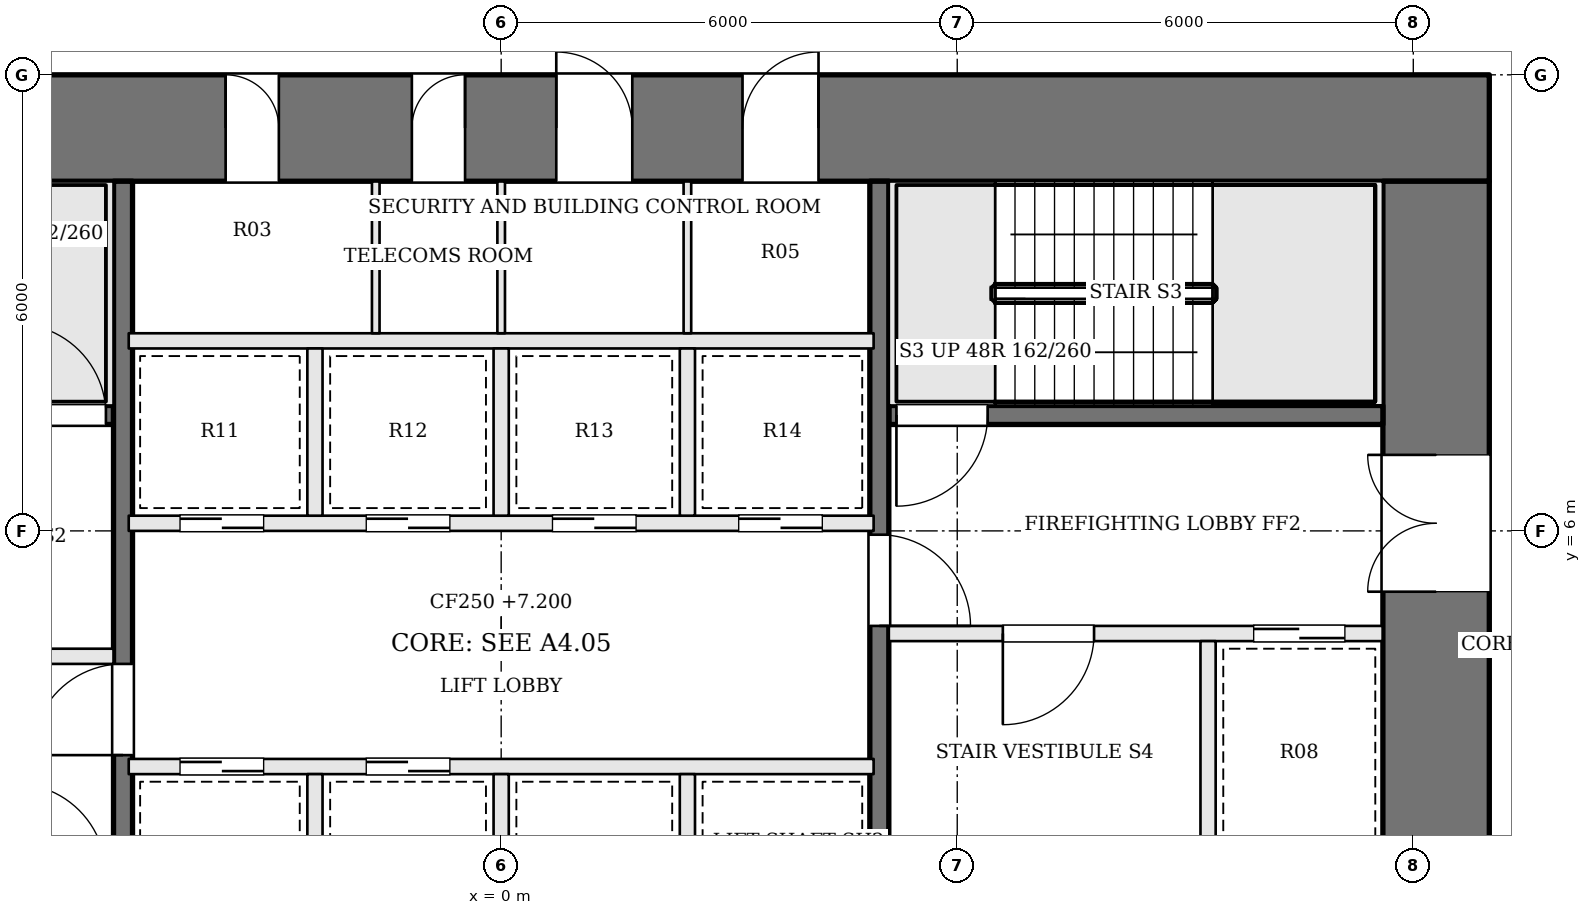
"""IFC4 building model, lengths in metres.
Left out: names, types, materials, properties, quantities, classifications, styles, units other than length and angle.
Written with IfcOpenShell. Run it as: python <this file> out.ifc"""

import sys

from ifc_helpers import new_model, si_unit, direction, frame, frame_2d, origin, place, context, subcontext, project, spatial, rectangle, extrude, element, fill, save


model = new_model("IFC4")
c1 = context("Model", 3, precision=1e-05, world=origin(), true_north=direction((0.0, 1.0)))
c2 = subcontext(c1, "Body", "Model", "MODEL_VIEW")
j1 = project(units=[si_unit("LENGTHUNIT", "METRE"), si_unit("PLANEANGLEUNIT", "RADIAN")], contexts=[c1])
p1 = place(None, origin())
s1 = spatial("IfcSite", under=j1, at=p1, CompositionType="ELEMENT")
p2 = place(p1, origin())
s2 = spatial("IfcBuilding", under=s1, at=p2, CompositionType="ELEMENT")
p3 = place(p2, frame((0.0, 0.0, 7.2)))
s3 = spatial("IfcBuildingStorey", under=s2, at=p3, CompositionType="ELEMENT", Elevation=7.2)
p4 = place(p3, frame((-13.0, 11.3, 0.0), z_axis=(0.0, 0.0, 1.0), x_axis=(1.0, 0.0, 0.0)))
e1 = element("IfcWall", 1, at=p4, inside=s3, PredefinedType="SHEAR", context=c2, shape_type="SweptSolid", body=[
    extrude(rectangle(XDim=26.0, YDim=1.4, at=frame_2d((13.0, 0.0))), origin(), (0.0, 0.0, 1.0), 7.8),
])
p5 = place(p4, frame((9.375, 0.0, 0.0)))
e2 = element("IfcOpeningElement", 2, at=p5, cuts=e1, PredefinedType="OPENING", context=c2, shape_type="SweptSolid", body=[
    extrude(rectangle(XDim=0.7, YDim=2.1, at=frame_2d((0.35, 1.05))), frame((0.0, 0.71, 0.0), z_axis=(0.0, -1.0, 0.0), x_axis=(1.0, 0.0, 0.0)), (0.0, 0.0, 1.0), 1.42),
])
p6 = place(p4, frame((11.825, 0.0, 0.0)))
e3 = element("IfcOpeningElement", 3, at=p6, cuts=e1, PredefinedType="OPENING", context=c2, shape_type="SweptSolid", body=[
    extrude(rectangle(XDim=0.7, YDim=2.1, at=frame_2d((0.35, 1.05))), frame((0.0, 0.71, 0.0), z_axis=(0.0, -1.0, 0.0), x_axis=(1.0, 0.0, 0.0)), (0.0, 0.0, 1.0), 1.42),
])
p7 = place(p4, frame((13.725, 0.0, 0.0)))
e4 = element("IfcOpeningElement", 4, at=p7, cuts=e1, PredefinedType="OPENING", context=c2, shape_type="SweptSolid", body=[
    extrude(rectangle(XDim=1.0, YDim=2.1, at=frame_2d((0.5, 1.05))), frame((0.0, 0.71, 0.0), z_axis=(0.0, -1.0, 0.0), x_axis=(1.0, 0.0, 0.0)), (0.0, 0.0, 1.0), 1.42),
])
p8 = place(p4, frame((16.175, 0.0, 0.0)))
e5 = element("IfcOpeningElement", 5, at=p8, cuts=e1, PredefinedType="OPENING", context=c2, shape_type="SweptSolid", body=[
    extrude(rectangle(XDim=1.0, YDim=2.1, at=frame_2d((0.5, 1.05))), frame((0.0, 0.71, 0.0), z_axis=(0.0, -1.0, 0.0), x_axis=(1.0, 0.0, 0.0)), (0.0, 0.0, 1.0), 1.42),
])
p9 = place(p3, frame((12.3, -1.6, 0.0), z_axis=(0.0, 0.0, 1.0), x_axis=(0.0, 1.0, 0.0)))
e6 = element("IfcWall", 6, at=p9, inside=s3, PredefinedType="SHEAR", context=c2, shape_type="SweptSolid", body=[
    extrude(rectangle(XDim=12.2, YDim=1.4, at=frame_2d((6.1, 0.0))), origin(), (0.0, 0.0, 1.0), 7.8),
])
p10 = place(p9, frame((6.8, 0.0, 0.0)))
e7 = element("IfcOpeningElement", 7, at=p10, cuts=e6, PredefinedType="OPENING", context=c2, shape_type="SweptSolid", body=[
    extrude(rectangle(XDim=1.8, YDim=2.1, at=frame_2d((0.9, 1.05))), frame((0.0, 0.71, 0.0), z_axis=(0.0, -1.0, 0.0), x_axis=(1.0, 0.0, 0.0)), (0.0, 0.0, 1.0), 1.42),
])
p11 = place(p3, frame((11.6, 7.525, 0.0), z_axis=(0.0, 0.0, 1.0), x_axis=(-1.0, 0.0, 0.0)))
e8 = element("IfcWall", 8, at=p11, inside=s3, PredefinedType="SOLIDWALL", context=c2, shape_type="SweptSolid", body=[
    extrude(rectangle(XDim=6.5, YDim=0.25, at=frame_2d((3.25, 0.0))), origin(), (0.0, 0.0, 1.0), 7.55),
])
p12 = place(p11, frame((5.2, 0.0, 0.0)))
e9 = element("IfcOpeningElement", 9, at=p12, cuts=e8, PredefinedType="OPENING", context=c2, shape_type="SweptSolid", body=[
    extrude(rectangle(XDim=1.2, YDim=2.1, at=frame_2d((0.6, 1.05))), frame((0.0, 0.135, 0.0), z_axis=(0.0, -1.0, 0.0), x_axis=(1.0, 0.0, 0.0)), (0.0, 0.0, 1.0), 0.27),
])
p13 = place(p3, frame((-11.6, 4.35, 0.0), z_axis=(0.0, 0.0, 1.0), x_axis=(1.0, 0.0, 0.0)))
e10 = element("IfcWall", 10, at=p13, inside=s3, PredefinedType="SOLIDWALL", context=c2, shape_type="SweptSolid", body=[
    extrude(rectangle(XDim=6.5, YDim=0.2, at=frame_2d((3.25, 0.0))), origin(), (0.0, 0.0, 1.0), 7.55),
])
p14 = place(p13, frame((3.8, 0.0, 0.0)))
e11 = element("IfcOpeningElement", 11, at=p14, cuts=e10, PredefinedType="OPENING", context=c2, shape_type="SweptSolid", body=[
    extrude(rectangle(XDim=1.2, YDim=2.1, at=frame_2d((0.6, 1.05))), frame((0.0, 0.11, 0.0), z_axis=(0.0, -1.0, 0.0), x_axis=(1.0, 0.0, 0.0)), (0.0, 0.0, 1.0), 0.22),
])
p15 = place(p13, frame((0.5, 0.0, 0.0)))
e12 = element("IfcOpeningElement", 12, at=p15, cuts=e10, PredefinedType="OPENING", context=c2, shape_type="SweptSolid", body=[
    extrude(rectangle(XDim=1.2, YDim=2.1, at=frame_2d((0.6, 1.05))), frame((0.0, 0.11, 0.0), z_axis=(0.0, -1.0, 0.0), x_axis=(1.0, 0.0, 0.0)), (0.0, 0.0, 1.0), 0.22),
])
p16 = place(p3, frame((11.6, 4.65, 0.0), z_axis=(0.0, 0.0, 1.0), x_axis=(-1.0, 0.0, 0.0)))
e13 = element("IfcWall", 13, at=p16, inside=s3, PredefinedType="SOLIDWALL", context=c2, shape_type="SweptSolid", body=[
    extrude(rectangle(XDim=6.5, YDim=0.2, at=frame_2d((3.25, 0.0))), origin(), (0.0, 0.0, 1.0), 7.55),
])
p17 = place(p16, frame((3.8, 0.0, 0.0)))
e14 = element("IfcOpeningElement", 14, at=p17, cuts=e13, PredefinedType="OPENING", context=c2, shape_type="SweptSolid", body=[
    extrude(rectangle(XDim=1.2, YDim=2.1, at=frame_2d((0.6, 1.05))), frame((0.0, 0.11, 0.0), z_axis=(0.0, -1.0, 0.0), x_axis=(1.0, 0.0, 0.0)), (0.0, 0.0, 1.0), 0.22),
])
p18 = place(p16, frame((0.5, 0.0, 0.0)))
e15 = element("IfcOpeningElement", 15, at=p18, cuts=e13, PredefinedType="OPENING", context=c2, shape_type="SweptSolid", body=[
    extrude(rectangle(XDim=1.2, YDim=2.1, at=frame_2d((0.6, 1.05))), frame((0.0, 0.11, 0.0), z_axis=(0.0, -1.0, 0.0), x_axis=(1.0, 0.0, 0.0)), (0.0, 0.0, 1.0), 0.22),
])
p19 = place(p3, frame((-11.6, 7.525, 0.0), z_axis=(0.0, 0.0, 1.0), x_axis=(1.0, 0.0, 0.0)))
e16 = element("IfcWall", 16, at=p19, inside=s3, PredefinedType="SOLIDWALL", context=c2, shape_type="SweptSolid", body=[
    extrude(rectangle(XDim=6.5, YDim=0.25, at=frame_2d((3.25, 0.0))), origin(), (0.0, 0.0, 1.0), 7.55),
])
p20 = place(p19, frame((5.2, 0.0, 0.0)))
e17 = element("IfcOpeningElement", 17, at=p20, cuts=e16, PredefinedType="OPENING", context=c2, shape_type="SweptSolid", body=[
    extrude(rectangle(XDim=1.2, YDim=2.1, at=frame_2d((0.6, 1.05))), frame((0.0, 0.135, 0.0), z_axis=(0.0, -1.0, 0.0), x_axis=(1.0, 0.0, 0.0)), (0.0, 0.0, 1.0), 0.27),
])
p21 = place(p3, frame((9.3, 4.55, 0.0), z_axis=(0.0, 0.0, 1.0), x_axis=(0.0, -1.0, 0.0)))
e18 = element("IfcWall", 18, at=p21, inside=s3, PredefinedType="SOLIDWALL", context=c2, shape_type="SweptSolid", body=[
    extrude(rectangle(XDim=3.0, YDim=0.2, at=frame_2d((1.5, 0.0))), origin(), (0.0, 0.0, 1.0), 7.55),
])
p22 = place(p3, frame((-4.975, -1.6, 0.0), z_axis=(0.0, 0.0, 1.0), x_axis=(0.0, 1.0, 0.0)))
e19 = element("IfcWall", 19, at=p22, inside=s3, PredefinedType="SOLIDWALL", context=c2, shape_type="SweptSolid", body=[
    extrude(rectangle(XDim=12.2, YDim=0.25, at=frame_2d((6.1, 0.0))), origin(), (0.0, 0.0, 1.0), 7.55),
])
p23 = place(p22, frame((4.65, 0.0, 0.0)))
e20 = element("IfcOpeningElement", 20, at=p23, cuts=e19, PredefinedType="OPENING", context=c2, shape_type="SweptSolid", body=[
    extrude(rectangle(XDim=1.2, YDim=2.1, at=frame_2d((0.6, 1.05))), frame((0.0, 0.135, 0.0), z_axis=(0.0, -1.0, 0.0), x_axis=(1.0, 0.0, 0.0)), (0.0, 0.0, 1.0), 0.27),
])
p24 = place(p3, frame((4.975, 10.6, 0.0), z_axis=(0.0, 0.0, 1.0), x_axis=(0.0, -1.0, 0.0)))
e21 = element("IfcWall", 21, at=p24, inside=s3, PredefinedType="SOLIDWALL", context=c2, shape_type="SweptSolid", body=[
    extrude(rectangle(XDim=12.2, YDim=0.25, at=frame_2d((6.1, 0.0))), origin(), (0.0, 0.0, 1.0), 7.55),
])
p25 = place(p24, frame((4.65, 0.0, 0.0)))
e22 = element("IfcOpeningElement", 22, at=p25, cuts=e21, PredefinedType="OPENING", context=c2, shape_type="SweptSolid", body=[
    extrude(rectangle(XDim=1.2, YDim=2.1, at=frame_2d((0.6, 1.05))), frame((0.0, 0.135, 0.0), z_axis=(0.0, -1.0, 0.0), x_axis=(1.0, 0.0, 0.0)), (0.0, 0.0, 1.0), 0.27),
])
p26 = place(p3, frame((-4.9, 2.9, 0.0), z_axis=(0.0, 0.0, 1.0), x_axis=(1.0, 0.0, 0.0)))
e23 = element("IfcWall", 23, at=p26, inside=s3, PredefinedType="SOLIDWALL", context=c2, shape_type="SweptSolid", body=[
    extrude(rectangle(XDim=9.8, YDim=0.2, at=frame_2d((4.9, 0.0))), origin(), (0.0, 0.0, 1.0), 7.55),
])
p27 = place(p26, frame((0.675, 0.0, 0.0)))
e24 = element("IfcOpeningElement", 24, at=p27, cuts=e23, PredefinedType="OPENING", context=c2, shape_type="SweptSolid", body=[
    extrude(rectangle(XDim=1.1, YDim=2.1, at=frame_2d((0.55, 1.05))), frame((0.0, 0.11, 0.0), z_axis=(0.0, -1.0, 0.0), x_axis=(1.0, 0.0, 0.0)), (0.0, 0.0, 1.0), 0.22),
])
p28 = place(p26, frame((3.125, 0.0, 0.0)))
e25 = element("IfcOpeningElement", 25, at=p28, cuts=e23, PredefinedType="OPENING", context=c2, shape_type="SweptSolid", body=[
    extrude(rectangle(XDim=1.1, YDim=2.1, at=frame_2d((0.55, 1.05))), frame((0.0, 0.11, 0.0), z_axis=(0.0, -1.0, 0.0), x_axis=(1.0, 0.0, 0.0)), (0.0, 0.0, 1.0), 0.22),
])
p29 = place(p3, frame((-4.9, 6.1, 0.0), z_axis=(0.0, 0.0, 1.0), x_axis=(1.0, 0.0, 0.0)))
e26 = element("IfcWall", 26, at=p29, inside=s3, PredefinedType="SOLIDWALL", context=c2, shape_type="SweptSolid", body=[
    extrude(rectangle(XDim=9.8, YDim=0.2, at=frame_2d((4.9, 0.0))), origin(), (0.0, 0.0, 1.0), 7.55),
])
p30 = place(p29, frame((0.675, 0.0, 0.0)))
e27 = element("IfcOpeningElement", 27, at=p30, cuts=e26, PredefinedType="OPENING", context=c2, shape_type="SweptSolid", body=[
    extrude(rectangle(XDim=1.1, YDim=2.1, at=frame_2d((0.55, 1.05))), frame((0.0, 0.11, 0.0), z_axis=(0.0, -1.0, 0.0), x_axis=(1.0, 0.0, 0.0)), (0.0, 0.0, 1.0), 0.22),
])
p31 = place(p29, frame((3.125, 0.0, 0.0)))
e28 = element("IfcOpeningElement", 28, at=p31, cuts=e26, PredefinedType="OPENING", context=c2, shape_type="SweptSolid", body=[
    extrude(rectangle(XDim=1.1, YDim=2.1, at=frame_2d((0.55, 1.05))), frame((0.0, 0.11, 0.0), z_axis=(0.0, -1.0, 0.0), x_axis=(1.0, 0.0, 0.0)), (0.0, 0.0, 1.0), 0.22),
])
p32 = place(p29, frame((5.575, 0.0, 0.0)))
e29 = element("IfcOpeningElement", 29, at=p32, cuts=e26, PredefinedType="OPENING", context=c2, shape_type="SweptSolid", body=[
    extrude(rectangle(XDim=1.1, YDim=2.1, at=frame_2d((0.55, 1.05))), frame((0.0, 0.11, 0.0), z_axis=(0.0, -1.0, 0.0), x_axis=(1.0, 0.0, 0.0)), (0.0, 0.0, 1.0), 0.22),
])
p33 = place(p29, frame((8.025, 0.0, 0.0)))
e30 = element("IfcOpeningElement", 30, at=p33, cuts=e26, PredefinedType="OPENING", context=c2, shape_type="SweptSolid", body=[
    extrude(rectangle(XDim=1.1, YDim=2.1, at=frame_2d((0.55, 1.05))), frame((0.0, 0.11, 0.0), z_axis=(0.0, -1.0, 0.0), x_axis=(1.0, 0.0, 0.0)), (0.0, 0.0, 1.0), 0.22),
])
p34 = place(p3, frame((-4.9, 8.5, 0.0), z_axis=(0.0, 0.0, 1.0), x_axis=(1.0, 0.0, 0.0)))
e31 = element("IfcWall", 31, at=p34, inside=s3, PredefinedType="SOLIDWALL", context=c2, shape_type="SweptSolid", body=[
    extrude(rectangle(XDim=9.8, YDim=0.2, at=frame_2d((4.9, 0.0))), origin(), (0.0, 0.0, 1.0), 7.55),
])
for number, where, z_axis, x_axis in (
    (32, (-2.45, 0.6, 0.0), (0.0, 0.0, 1.0), (0.0, 1.0, 0.0)),
    (33, (0.0, 0.6, 0.0), (0.0, 0.0, 1.0), (0.0, 1.0, 0.0)),
    (34, (2.45, 0.6, 0.0), (0.0, 0.0, 1.0), (0.0, 1.0, 0.0)),
    (35, (-2.45, 6.2, 0.0), (0.0, 0.0, 1.0), (0.0, 1.0, 0.0)),
    (36, (0.0, 6.2, 0.0), (0.0, 0.0, 1.0), (0.0, 1.0, 0.0)),
    (37, (2.45, 6.2, 0.0), (0.0, 0.0, 1.0), (0.0, 1.0, 0.0)),
):
    element("IfcWall", number, at=place(p3, frame(where, z_axis=z_axis, x_axis=x_axis)), inside=s3, PredefinedType="SOLIDWALL", context=c2, shape_type="SweptSolid", body=[
        extrude(rectangle(XDim=2.2, YDim=0.2, at=frame_2d((1.1, 0.0))), origin(), (0.0, 0.0, 1.0), 7.55),
    ])
for number, where, z_axis, x_axis in (
    (38, (-1.65, 8.6, 0.0), (0.0, 0.0, 1.0), (0.0, 1.0, 0.0)),
    (39, (0.0, 8.6, 0.0), (0.0, 0.0, 1.0), (0.0, 1.0, 0.0)),
    (40, (2.45, 8.6, 0.0), (0.0, 0.0, 1.0), (0.0, 1.0, 0.0)),
):
    element("IfcWall", number, at=place(p3, frame(where, z_axis=z_axis, x_axis=x_axis)), inside=s3, PredefinedType="PARTITIONING", context=c2, shape_type="SweptSolid", body=[
        extrude(rectangle(XDim=2.0, YDim=0.1, at=frame_2d((1.0, 0.0))), origin(), (0.0, 0.0, 1.0), 7.55),
    ])
p35 = place(p10, origin())
e41 = element("IfcDoor", 41, at=p35, inside=s3, OperationType="DOUBLE_DOOR_SINGLE_SWING", PredefinedType="DOOR", context=c2, shape_type="SweptSolid", body=[
    extrude(rectangle(XDim=1.8, YDim=2.1, at=frame_2d((0.9, 1.05))), frame((0.0, 0.025, 0.0), z_axis=(0.0, -1.0, 0.0), x_axis=(1.0, 0.0, 0.0)), (0.0, 0.0, 1.0), 0.05),
])
fill(e7, e41)
p36 = place(p23, origin())
e42 = element("IfcDoor", 42, at=p36, inside=s3, OperationType="SINGLE_SWING_LEFT", PredefinedType="DOOR", context=c2, shape_type="SweptSolid", body=[
    extrude(rectangle(XDim=1.2, YDim=2.1, at=frame_2d((0.6, 1.05))), frame((0.0, 0.025, 0.0), z_axis=(0.0, -1.0, 0.0), x_axis=(1.0, 0.0, 0.0)), (0.0, 0.0, 1.0), 0.05),
])
fill(e20, e42)
p37 = place(p25, origin())
e43 = element("IfcDoor", 43, at=p37, inside=s3, OperationType="SINGLE_SWING_RIGHT", PredefinedType="DOOR", context=c2, shape_type="SweptSolid", body=[
    extrude(rectangle(XDim=1.2, YDim=2.1, at=frame_2d((0.6, 1.05))), frame((0.0, 0.025, 0.0), z_axis=(0.0, -1.0, 0.0), x_axis=(1.0, 0.0, 0.0)), (0.0, 0.0, 1.0), 0.05),
])
fill(e22, e43)
p38 = place(p17, origin())
e44 = element("IfcDoor", 44, at=p38, inside=s3, OperationType="SINGLE_SWING_RIGHT", PredefinedType="DOOR", context=c2, shape_type="SweptSolid", body=[
    extrude(rectangle(XDim=1.2, YDim=2.1, at=frame_2d((0.6, 1.05))), frame((0.0, 0.025, 0.0), z_axis=(0.0, -1.0, 0.0), x_axis=(1.0, 0.0, 0.0)), (0.0, 0.0, 1.0), 0.05),
])
fill(e14, e44)
p39 = place(p12, origin())
e45 = element("IfcDoor", 45, at=p39, inside=s3, OperationType="SINGLE_SWING_RIGHT", PredefinedType="DOOR", context=c2, shape_type="SweptSolid", body=[
    extrude(rectangle(XDim=1.2, YDim=2.1, at=frame_2d((0.6, 1.05))), frame((0.0, 0.025, 0.0), z_axis=(0.0, -1.0, 0.0), x_axis=(1.0, 0.0, 0.0)), (0.0, 0.0, 1.0), 0.05),
])
fill(e9, e45)
p40 = place(p20, origin())
e46 = element("IfcDoor", 46, at=p40, inside=s3, OperationType="SINGLE_SWING_LEFT", PredefinedType="DOOR", context=c2, shape_type="SweptSolid", body=[
    extrude(rectangle(XDim=1.2, YDim=2.1, at=frame_2d((0.6, 1.05))), frame((0.0, 0.025, 0.0), z_axis=(0.0, -1.0, 0.0), x_axis=(1.0, 0.0, 0.0)), (0.0, 0.0, 1.0), 0.05),
])
fill(e17, e46)
p41 = place(p18, origin())
e47 = element("IfcDoor", 47, at=p41, inside=s3, OperationType="SLIDING_TO_RIGHT", PredefinedType="DOOR", context=c2, shape_type="SweptSolid", body=[
    extrude(rectangle(XDim=1.2, YDim=2.1, at=frame_2d((0.6, 1.05))), frame((0.0, 0.025, 0.0), z_axis=(0.0, -1.0, 0.0), x_axis=(1.0, 0.0, 0.0)), (0.0, 0.0, 1.0), 0.05),
])
fill(e15, e47)
p42 = place(p27, origin())
e48 = element("IfcDoor", 48, at=p42, inside=s3, OperationType="SLIDING_TO_RIGHT", PredefinedType="DOOR", context=c2, shape_type="SweptSolid", body=[
    extrude(rectangle(XDim=1.1, YDim=2.1, at=frame_2d((0.55, 1.05))), frame((0.0, 0.025, 0.0), z_axis=(0.0, -1.0, 0.0), x_axis=(1.0, 0.0, 0.0)), (0.0, 0.0, 1.0), 0.05),
])
fill(e24, e48)
p43 = place(p28, origin())
e49 = element("IfcDoor", 49, at=p43, inside=s3, OperationType="SLIDING_TO_LEFT", PredefinedType="DOOR", context=c2, shape_type="SweptSolid", body=[
    extrude(rectangle(XDim=1.1, YDim=2.1, at=frame_2d((0.55, 1.05))), frame((0.0, 0.025, 0.0), z_axis=(0.0, -1.0, 0.0), x_axis=(1.0, 0.0, 0.0)), (0.0, 0.0, 1.0), 0.05),
])
fill(e25, e49)
p44 = place(p30, origin())
e50 = element("IfcDoor", 50, at=p44, inside=s3, OperationType="SLIDING_TO_RIGHT", PredefinedType="DOOR", context=c2, shape_type="SweptSolid", body=[
    extrude(rectangle(XDim=1.1, YDim=2.1, at=frame_2d((0.55, 1.05))), frame((0.0, 0.025, 0.0), z_axis=(0.0, -1.0, 0.0), x_axis=(1.0, 0.0, 0.0)), (0.0, 0.0, 1.0), 0.05),
])
fill(e27, e50)
p45 = place(p31, origin())
e51 = element("IfcDoor", 51, at=p45, inside=s3, OperationType="SLIDING_TO_LEFT", PredefinedType="DOOR", context=c2, shape_type="SweptSolid", body=[
    extrude(rectangle(XDim=1.1, YDim=2.1, at=frame_2d((0.55, 1.05))), frame((0.0, 0.025, 0.0), z_axis=(0.0, -1.0, 0.0), x_axis=(1.0, 0.0, 0.0)), (0.0, 0.0, 1.0), 0.05),
])
fill(e28, e51)
p46 = place(p32, origin())
e52 = element("IfcDoor", 52, at=p46, inside=s3, OperationType="SLIDING_TO_RIGHT", PredefinedType="DOOR", context=c2, shape_type="SweptSolid", body=[
    extrude(rectangle(XDim=1.1, YDim=2.1, at=frame_2d((0.55, 1.05))), frame((0.0, 0.025, 0.0), z_axis=(0.0, -1.0, 0.0), x_axis=(1.0, 0.0, 0.0)), (0.0, 0.0, 1.0), 0.05),
])
fill(e29, e52)
p47 = place(p33, origin())
e53 = element("IfcDoor", 53, at=p47, inside=s3, OperationType="SLIDING_TO_LEFT", PredefinedType="DOOR", context=c2, shape_type="SweptSolid", body=[
    extrude(rectangle(XDim=1.1, YDim=2.1, at=frame_2d((0.55, 1.05))), frame((0.0, 0.025, 0.0), z_axis=(0.0, -1.0, 0.0), x_axis=(1.0, 0.0, 0.0)), (0.0, 0.0, 1.0), 0.05),
])
fill(e30, e53)
p48 = place(p5, origin())
e54 = element("IfcDoor", 54, at=p48, inside=s3, OperationType="SINGLE_SWING_LEFT", PredefinedType="DOOR", context=c2, shape_type="SweptSolid", body=[
    extrude(rectangle(XDim=0.7, YDim=2.1, at=frame_2d((0.35, 1.05))), frame((0.0, 0.025, 0.0), z_axis=(0.0, -1.0, 0.0), x_axis=(1.0, 0.0, 0.0)), (0.0, 0.0, 1.0), 0.05),
])
fill(e2, e54)
p49 = place(p6, origin())
e55 = element("IfcDoor", 55, at=p49, inside=s3, OperationType="SINGLE_SWING_RIGHT", PredefinedType="DOOR", context=c2, shape_type="SweptSolid", body=[
    extrude(rectangle(XDim=0.7, YDim=2.1, at=frame_2d((0.35, 1.05))), frame((0.0, 0.025, 0.0), z_axis=(0.0, -1.0, 0.0), x_axis=(1.0, 0.0, 0.0)), (0.0, 0.0, 1.0), 0.05),
])
fill(e3, e55)
p50 = place(p7, origin())
e56 = element("IfcDoor", 56, at=p50, inside=s3, OperationType="SINGLE_SWING_LEFT", PredefinedType="DOOR", context=c2, shape_type="SweptSolid", body=[
    extrude(rectangle(XDim=1.0, YDim=2.1, at=frame_2d((0.5, 1.05))), frame((0.0, 0.025, 0.0), z_axis=(0.0, -1.0, 0.0), x_axis=(1.0, 0.0, 0.0)), (0.0, 0.0, 1.0), 0.05),
])
fill(e4, e56)
p51 = place(p8, origin())
e57 = element("IfcDoor", 57, at=p51, inside=s3, OperationType="SINGLE_SWING_RIGHT", PredefinedType="DOOR", context=c2, shape_type="SweptSolid", body=[
    extrude(rectangle(XDim=1.0, YDim=2.1, at=frame_2d((0.5, 1.05))), frame((0.0, 0.025, 0.0), z_axis=(0.0, -1.0, 0.0), x_axis=(1.0, 0.0, 0.0)), (0.0, 0.0, 1.0), 0.05),
])
fill(e5, e57)
save(model, sys.argv[1])
